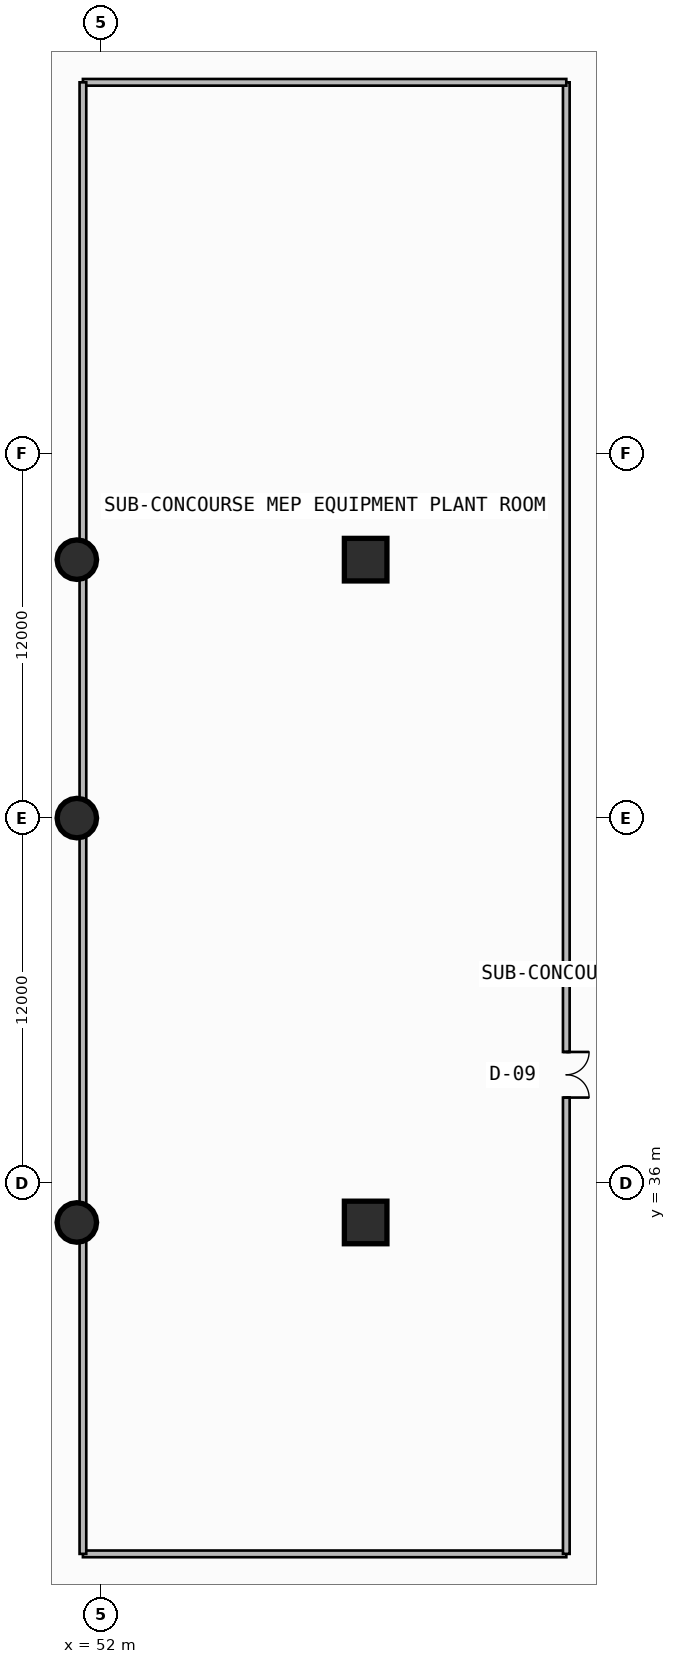
"""IFC4 building model, lengths in metres.
Left out: names, types, materials, properties, quantities, classifications, styles, units other than length and angle.
Written with IfcOpenShell. Run it as: python <this file> out.ifc"""

import sys

from ifc_helpers import new_model, si_unit, direction, frame, frame_2d, origin, origin_2d, place, context, subcontext, project, spatial, rectangle, circle, extrude, element, fill, save


model = new_model("IFC4")
c1 = context("Model", 3, precision=1e-05, world=origin(), true_north=direction((0.0, 1.0)))
c2 = subcontext(c1, "Body", "Model", "MODEL_VIEW")
j1 = project(units=[si_unit("LENGTHUNIT", "METRE"), si_unit("PLANEANGLEUNIT", "RADIAN")], contexts=[c1])
p1 = place(None, origin())
s1 = spatial("IfcSite", under=j1, at=p1, CompositionType="ELEMENT")
p2 = place(p1, origin())
s2 = spatial("IfcBuilding", under=s1, at=p2, CompositionType="ELEMENT")
p3 = place(p2, frame((0.0, 0.0, -6.0)))
s3 = spatial("IfcBuildingStorey", under=s2, at=p3, CompositionType="ELEMENT", Elevation=-6.0)
for number, where, z_axis, x_axis in (
    (1, (51.2, 34.7, -0.6), (0.0, 0.0, 1.0), (1.0, 0.0, 0.0)),
    (2, (51.2, 48.0, -0.6), (0.0, 0.0, 1.0), (1.0, 0.0, 0.0)),
    (3, (51.2, 56.5, -0.6), (0.0, 0.0, 1.0), (1.0, 0.0, 0.0)),
):
    element("IfcColumn", number, at=place(p3, frame(where, z_axis=z_axis, x_axis=x_axis)), inside=s3, PredefinedType="PILASTER", context=c2, shape_type="SweptSolid", body=[
        extrude(circle(Radius=0.65, at=origin_2d()), origin(), (0.0, 0.0, 1.0), 6.6),
    ])
for number, where, z_axis, x_axis in (
    (4, (60.7, 34.7, -0.6), (0.0, 0.0, 1.0), (1.0, 0.0, 0.0)),
    (5, (60.7, 56.5, -0.6), (0.0, 0.0, 1.0), (1.0, 0.0, 0.0)),
):
    element("IfcColumn", number, at=place(p3, frame(where, z_axis=z_axis, x_axis=x_axis)), inside=s3, PredefinedType="COLUMN", context=c2, shape_type="SweptSolid", body=[
        extrude(rectangle(XDim=1.4, YDim=1.4, at=origin_2d()), origin(), (0.0, 0.0, 1.0), 6.6),
    ])
p4 = place(p3, frame((51.4, 23.8, 0.0), z_axis=(0.0, 0.0, 1.0), x_axis=(1.0, 0.0, 0.0)))
e6 = element("IfcWall", 6, at=p4, inside=s3, PredefinedType="SOLIDWALL", context=c2, shape_type="SweptSolid", body=[
    extrude(rectangle(XDim=15.9, YDim=0.22, at=frame_2d((7.95, 0.0))), origin(), (0.0, 0.0, 1.0), 4.885),
])
p5 = place(p3, frame((67.3, 23.8, 0.0), z_axis=(0.0, 0.0, 1.0), x_axis=(0.0, 1.0, 0.0)))
e7 = element("IfcWall", 7, at=p5, inside=s3, PredefinedType="SOLIDWALL", context=c2, shape_type="SweptSolid", body=[
    extrude(rectangle(XDim=48.4, YDim=0.22, at=frame_2d((24.2, 0.0))), origin(), (0.0, 0.0, 1.0), 4.885),
])
p6 = place(p5, frame((15.008, 0.0, 0.0)))
e8 = element("IfcOpeningElement", 8, at=p6, cuts=e7, PredefinedType="OPENING", context=c2, shape_type="SweptSolid", body=[
    extrude(rectangle(XDim=1.5, YDim=2.25, at=frame_2d((0.75, 1.125))), frame((0.0, 0.12, 0.0), z_axis=(0.0, -1.0, 0.0), x_axis=(1.0, 0.0, 0.0)), (0.0, 0.0, 1.0), 0.24),
])
p7 = place(p3, frame((67.3, 72.2, 0.0), z_axis=(0.0, 0.0, 1.0), x_axis=(-1.0, 0.0, 0.0)))
e9 = element("IfcWall", 9, at=p7, inside=s3, PredefinedType="SOLIDWALL", context=c2, shape_type="SweptSolid", body=[
    extrude(rectangle(XDim=15.9, YDim=0.22, at=frame_2d((7.95, 0.0))), origin(), (0.0, 0.0, 1.0), 4.885),
])
p8 = place(p3, frame((51.4, 72.2, 0.0), z_axis=(0.0, 0.0, 1.0), x_axis=(0.0, -1.0, 0.0)))
e10 = element("IfcWall", 10, at=p8, inside=s3, PredefinedType="SOLIDWALL", context=c2, shape_type="SweptSolid", body=[
    extrude(rectangle(XDim=48.4, YDim=0.22, at=frame_2d((24.2, 0.0))), origin(), (0.0, 0.0, 1.0), 4.885),
])
p9 = place(p6, frame((1.5, 0.0, 0.0), z_axis=(0.0, 0.0, 1.0), x_axis=(-1.0, 0.0, 0.0)))
e11 = element("IfcDoor", 11, at=p9, inside=s3, OperationType="DOUBLE_DOOR_SINGLE_SWING", PredefinedType="DOOR", context=c2, shape_type="SweptSolid", body=[
    extrude(rectangle(XDim=1.5, YDim=2.25, at=frame_2d((0.75, 1.125))), frame((0.0, 0.025, 0.0), z_axis=(0.0, -1.0, 0.0), x_axis=(1.0, 0.0, 0.0)), (0.0, 0.0, 1.0), 0.05),
])
fill(e8, e11)
save(model, sys.argv[1])
